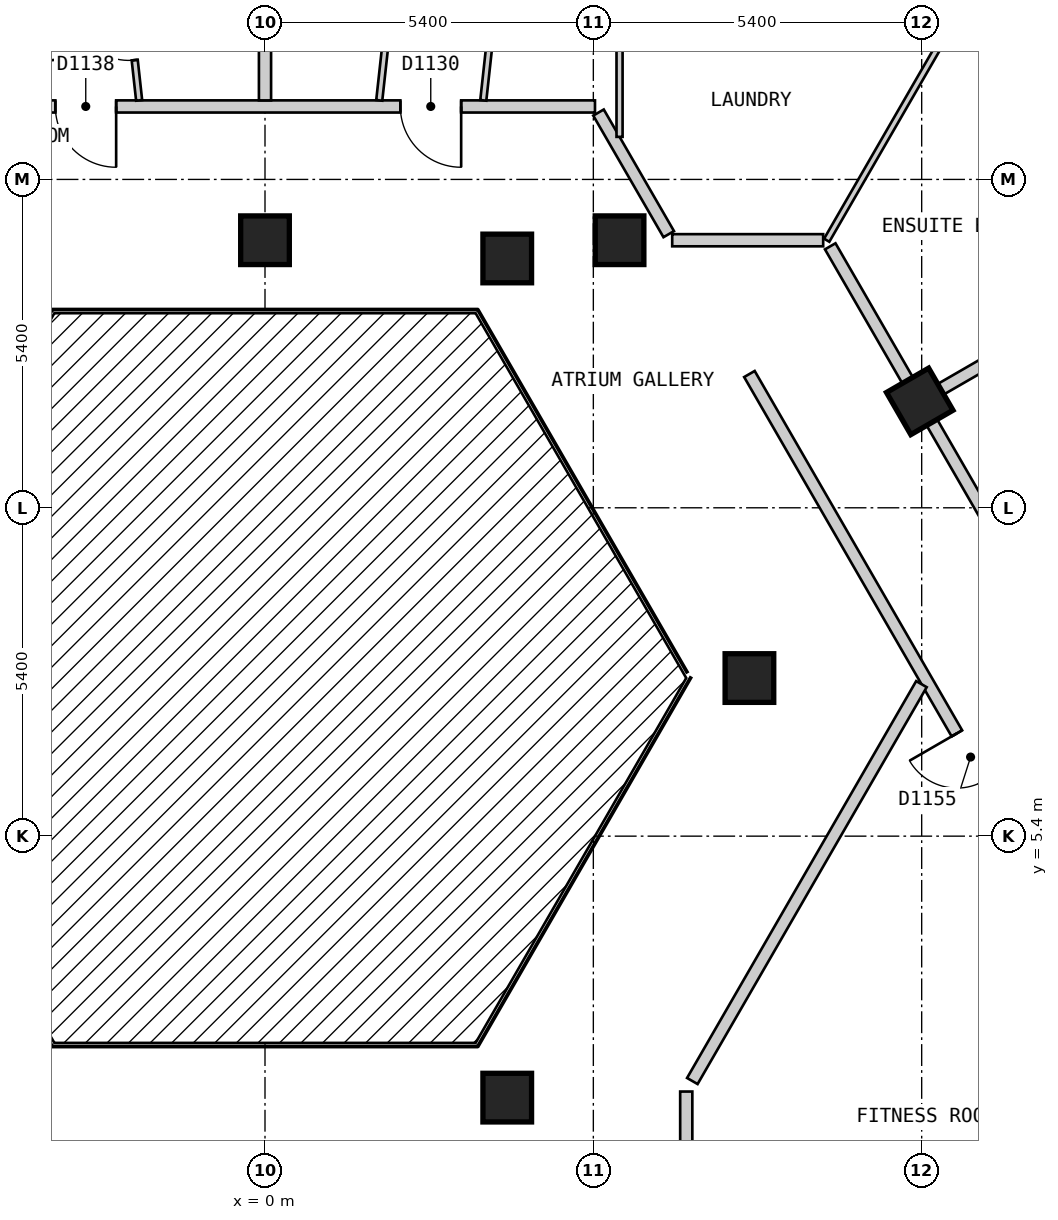
"""IFC4 building model, lengths in metres.
Left out: names, types, materials, properties, quantities, classifications, styles, units other than length and angle.
Written with IfcOpenShell. Run it as: python <this file> out.ifc"""

import sys

from ifc_helpers import new_model, si_unit, direction, frame, frame_2d, origin, origin_2d, place, context, subcontext, project, spatial, rectangle, extrude, element, fill, save


model = new_model("IFC4")
c1 = context("Model", 3, precision=1e-05, world=origin(), true_north=direction((0.0, 1.0)))
c2 = subcontext(c1, "Body", "Model", "MODEL_VIEW")
j1 = project(units=[si_unit("LENGTHUNIT", "METRE"), si_unit("PLANEANGLEUNIT", "RADIAN")], contexts=[c1])
p1 = place(None, origin())
s1 = spatial("IfcSite", under=j1, at=p1, CompositionType="ELEMENT")
p2 = place(p1, origin())
s2 = spatial("IfcBuilding", under=s1, at=p2, CompositionType="ELEMENT")
p3 = place(p2, frame((0.0, 0.0, 138.6)))
s3 = spatial("IfcBuildingStorey", under=s2, at=p3, CompositionType="ELEMENT", Elevation=138.6)
for number, where, z_axis, x_axis in (
    (1, (3.984, 1.1, 0.0), (0.0, 0.0, 1.0), (1.0, 0.0, 0.0)),
    (2, (7.967, 8.0, 0.0), (0.0, 0.0, 1.0), (1.0, 0.0, 0.0)),
    (3, (10.768, 12.55, 0.0), (0.0, 0.0, 1.0), (-0.5, 0.866, 0.0)),
    (4, (5.831, 15.2, 0.0), (0.0, 0.0, 1.0), (-1.0, 0.0, 0.0)),
    (5, (3.984, 14.9, 0.0), (0.0, 0.0, 1.0), (1.0, 0.0, 0.0)),
    (6, (0.0, 15.2, 0.0), (0.0, 0.0, 1.0), (-1.0, 0.0, 0.0)),
):
    element("IfcColumn", number, at=place(p3, frame(where, z_axis=z_axis, x_axis=x_axis)), inside=s3, PredefinedType="COLUMN", context=c2, shape_type="SweptSolid", body=[
        extrude(rectangle(XDim=0.8, YDim=0.8, at=origin_2d()), origin(), (0.0, 0.0, 1.0), 3.0),
    ])
p4 = place(p3, frame((5.485, 17.3, 0.0), z_axis=(0.0, 0.0, 1.0), x_axis=(0.500027479704, -0.866009537788, 0.0)))
e7 = element("IfcWall", 7, at=p4, inside=s3, PredefinedType="PARTITIONING", context=c2, shape_type="SweptSolid", body=[
    extrude(rectangle(XDim=2.309, YDim=0.2, at=frame_2d((1.155, 0.0))), origin(), (0.0, 0.0, 1.0), 2.7),
])
p5 = place(p3, frame((7.967, 13.0, 0.0), z_axis=(0.0, 0.0, 1.0), x_axis=(0.50003774998, -0.866003607726, 0.0)))
e8 = element("IfcWall", 8, at=p5, inside=s3, PredefinedType="PARTITIONING", context=c2, shape_type="SweptSolid", body=[
    extrude(rectangle(XDim=14.433, YDim=0.2, at=frame_2d((7.217, 0.0))), origin(), (0.0, 0.0, 1.0), 2.7),
])
p6 = place(p5, frame((6.824, 0.0, 0.0)))
e9 = element("IfcOpeningElement", 9, at=p6, cuts=e8, PredefinedType="OPENING", context=c2, shape_type="SweptSolid", body=[
    extrude(rectangle(XDim=0.9, YDim=2.1, at=frame_2d((0.45, 1.05))), frame((0.0, 0.11, 0.0), z_axis=(0.0, -1.0, 0.0), x_axis=(1.0, 0.0, 0.0)), (0.0, 0.0, 1.0), 0.22),
])
p7 = place(p3, frame((9.296, 15.1, 0.0), z_axis=(0.0, 0.0, 1.0), x_axis=(0.499974024244, -0.866040400375, 0.0)))
e10 = element("IfcWall", 10, at=p7, inside=s3, PredefinedType="PARTITIONING", context=c2, shape_type="SweptSolid", body=[
    extrude(rectangle(XDim=16.857, YDim=0.2, at=frame_2d((8.429, 0.0))), origin(), (0.0, 0.0, 1.0), 2.7),
])
p8 = place(p7, frame((11.522, 0.0, 0.0)))
e11 = element("IfcOpeningElement", 11, at=p8, cuts=e10, PredefinedType="OPENING", context=c2, shape_type="SweptSolid", body=[
    extrude(rectangle(XDim=1.0, YDim=2.1, at=frame_2d((0.5, 1.05))), frame((0.0, 0.11, 0.0), z_axis=(0.0, -1.0, 0.0), x_axis=(1.0, 0.0, 0.0)), (0.0, 0.0, 1.0), 0.22),
])
p9 = place(p3, frame((6.697, 15.2, 0.0), z_axis=(0.0, 0.0, 1.0), x_axis=(1.0, 0.0, 0.0)))
e12 = element("IfcWall", 12, at=p9, inside=s3, PredefinedType="PARTITIONING", context=c2, shape_type="SweptSolid", body=[
    extrude(rectangle(XDim=2.483, YDim=0.2, at=frame_2d((1.241, 0.0))), origin(), (0.0, 0.0, 1.0), 2.7),
])
p10 = place(p3, frame((-5.312, 17.4, 0.0), z_axis=(0.0, 0.0, 1.0), x_axis=(1.0, 0.0, 0.0)))
e13 = element("IfcWall", 13, at=p10, inside=s3, PredefinedType="PARTITIONING", context=c2, shape_type="SweptSolid", body=[
    extrude(rectangle(XDim=10.739, YDim=0.2, at=frame_2d((5.37, 0.0))), origin(), (0.0, 0.0, 1.0), 2.7),
])
p11 = place(p10, frame((7.538, 0.0, 0.0)))
e14 = element("IfcOpeningElement", 14, at=p11, cuts=e13, PredefinedType="OPENING", context=c2, shape_type="SweptSolid", body=[
    extrude(rectangle(XDim=1.0, YDim=2.1, at=frame_2d((0.5, 1.05))), frame((0.0, 0.11, 0.0), z_axis=(0.0, -1.0, 0.0), x_axis=(1.0, 0.0, 0.0)), (0.0, 0.0, 1.0), 0.22),
])
p12 = place(p10, frame((1.864, 0.0, 0.0)))
e15 = element("IfcOpeningElement", 15, at=p12, cuts=e13, PredefinedType="OPENING", context=c2, shape_type="SweptSolid", body=[
    extrude(rectangle(XDim=1.0, YDim=2.1, at=frame_2d((0.5, 1.05))), frame((0.0, 0.11, 0.0), z_axis=(0.0, -1.0, 0.0), x_axis=(1.0, 0.0, 0.0)), (0.0, 0.0, 1.0), 0.22),
])
p13 = place(p3, frame((7.028, 1.373, 0.0), z_axis=(0.0, 0.0, 1.0), x_axis=(0.499954271211, 0.866051803703, 0.0)))
e16 = element("IfcWall", 16, at=p13, inside=s3, PredefinedType="PARTITIONING", context=c2, shape_type="SweptSolid", body=[
    extrude(rectangle(XDim=7.536, YDim=0.2, at=frame_2d((3.768, 0.0))), origin(), (0.0, 0.0, 1.0), 2.7),
])
p14 = place(p3, frame((6.928, -2.8, 0.0), z_axis=(0.0, 0.0, 1.0), x_axis=(0.0, 1.0, 0.0)))
e17 = element("IfcWall", 17, at=p14, inside=s3, PredefinedType="PARTITIONING", context=c2, shape_type="SweptSolid", body=[
    extrude(rectangle(XDim=4.0, YDim=0.2, at=frame_2d((2.0, 0.0))), origin(), (0.0, 0.0, 1.0), 2.7),
])
p15 = place(p3, frame((11.713, 19.313, 0.0), z_axis=(0.0, 0.0, 1.0), x_axis=(0.499945064984, -0.866057118208, 0.0)))
e18 = element("IfcWall", 18, at=p15, inside=s3, PredefinedType="PARTITIONING", context=c2, shape_type="SweptSolid", body=[
    extrude(rectangle(XDim=5.285, YDim=0.1, at=frame_2d((2.642, 0.0))), origin(), (0.0, 0.0, 1.0), 2.7),
])
p16 = place(p15, frame((2.242, 0.0, 0.0)))
e19 = element("IfcOpeningElement", 19, at=p16, cuts=e18, PredefinedType="OPENING", context=c2, shape_type="SweptSolid", body=[
    extrude(rectangle(XDim=0.8, YDim=2.1, at=frame_2d((0.4, 1.05))), frame((0.0, 0.06, 0.0), z_axis=(0.0, -1.0, 0.0), x_axis=(1.0, 0.0, 0.0)), (0.0, 0.0, 1.0), 0.12),
])
p17 = place(p3, frame((-2.319, 19.77, 0.0), z_axis=(0.0, 0.0, 1.0), x_axis=(0.109046821538, -0.994036614372, 0.0)))
e20 = element("IfcWall", 20, at=p17, inside=s3, PredefinedType="PARTITIONING", context=c2, shape_type="SweptSolid", body=[
    extrude(rectangle(XDim=2.284, YDim=0.1, at=frame_2d((1.142, 0.0))), origin(), (0.0, 0.0, 1.0), 2.7),
])
p18 = place(p17, frame((0.717, 0.0, 0.0)))
e21 = element("IfcOpeningElement", 21, at=p18, cuts=e20, PredefinedType="OPENING", context=c2, shape_type="SweptSolid", body=[
    extrude(rectangle(XDim=0.9, YDim=2.1, at=frame_2d((0.45, 1.05))), frame((0.0, 0.06, 0.0), z_axis=(0.0, -1.0, 0.0), x_axis=(1.0, 0.0, 0.0)), (0.0, 0.0, 1.0), 0.12),
])
p19 = place(p3, frame((9.238, 15.2, 0.0), z_axis=(0.0, 0.0, 1.0), x_axis=(0.499988022762, 0.866032318735, 0.0)))
e22 = element("IfcWall", 22, at=p19, inside=s3, PredefinedType="PARTITIONING", context=c2, shape_type="SweptSolid", body=[
    extrude(rectangle(XDim=4.748, YDim=0.1, at=frame_2d((2.374, 0.0))), origin(), (0.0, 0.0, 1.0), 2.7),
])
p20 = place(p3, frame((3.59, 17.5, 0.0), z_axis=(0.0, 0.0, 1.0), x_axis=(0.108938463119, 0.994048495423, 0.0)))
e23 = element("IfcWall", 23, at=p20, inside=s3, PredefinedType="PARTITIONING", context=c2, shape_type="SweptSolid", body=[
    extrude(rectangle(XDim=4.074, YDim=0.1, at=frame_2d((2.037, 0.0))), origin(), (0.0, 0.0, 1.0), 2.7),
])
p21 = place(p20, frame((1.612, 0.0, 0.0)))
e24 = element("IfcOpeningElement", 24, at=p21, cuts=e23, PredefinedType="OPENING", context=c2, shape_type="SweptSolid", body=[
    extrude(rectangle(XDim=0.8, YDim=2.1, at=frame_2d((0.4, 1.05))), frame((0.0, 0.06, 0.0), z_axis=(0.0, -1.0, 0.0), x_axis=(1.0, 0.0, 0.0)), (0.0, 0.0, 1.0), 0.12),
])
p22 = place(p3, frame((1.879, 17.5, 0.0), z_axis=(0.0, 0.0, 1.0), x_axis=(0.10923450369, 0.994016007519, 0.0)))
e25 = element("IfcWall", 25, at=p22, inside=s3, PredefinedType="PARTITIONING", context=c2, shape_type="SweptSolid", body=[
    extrude(rectangle(XDim=4.074, YDim=0.1, at=frame_2d((2.037, 0.0))), origin(), (0.0, 0.0, 1.0), 2.7),
])
p23 = place(p22, frame((1.562, 0.0, 0.0)))
e26 = element("IfcOpeningElement", 26, at=p23, cuts=e25, PredefinedType="OPENING", context=c2, shape_type="SweptSolid", body=[
    extrude(rectangle(XDim=0.9, YDim=2.1, at=frame_2d((0.45, 1.05))), frame((0.0, 0.06, 0.0), z_axis=(0.0, -1.0, 0.0), x_axis=(1.0, 0.0, 0.0)), (0.0, 0.0, 1.0), 0.12),
])
p24 = place(p3, frame((5.831, 16.9, 0.0), z_axis=(0.0, 0.0, 1.0), x_axis=(0.0, 1.0, 0.0)))
e27 = element("IfcWall", 27, at=p24, inside=s3, PredefinedType="PARTITIONING", context=c2, shape_type="SweptSolid", body=[
    extrude(rectangle(XDim=4.65, YDim=0.1, at=frame_2d((2.325, 0.0))), origin(), (0.0, 0.0, 1.0), 2.7),
])
p25 = place(p3, frame((0.0, 17.5, 0.0), z_axis=(0.0, 0.0, 1.0), x_axis=(0.0, 1.0, 0.0)))
e28 = element("IfcWall", 28, at=p25, inside=s3, PredefinedType="PARTITIONING", context=c2, shape_type="SweptSolid", body=[
    extrude(rectangle(XDim=7.8, YDim=0.2, at=frame_2d((3.9, 0.0))), origin(), (0.0, 0.0, 1.0), 2.7),
])
p26 = place(p3, frame((10.854, 12.6, 0.0), z_axis=(0.0, 0.0, 1.0), x_axis=(0.866031112038, 0.499990112884, 0.0)))
e29 = element("IfcWall", 29, at=p26, inside=s3, PredefinedType="PARTITIONING", context=c2, shape_type="SweptSolid", body=[
    extrude(rectangle(XDim=3.948, YDim=0.2, at=frame_2d((1.974, 0.0))), origin(), (0.0, 0.0, 1.0), 2.7),
])
p27 = place(p11, origin())
e30 = element("IfcDoor", 30, at=p27, inside=s3, OperationType="SINGLE_SWING_RIGHT", PredefinedType="DOOR", context=c2, shape_type="SweptSolid", body=[
    extrude(rectangle(XDim=1.0, YDim=2.1, at=frame_2d((0.5, 1.05))), frame((0.0, 0.025, 0.0), z_axis=(0.0, -1.0, 0.0), x_axis=(1.0, 0.0, 0.0)), (0.0, 0.0, 1.0), 0.05),
])
fill(e14, e30)
p28 = place(p12, origin())
e31 = element("IfcDoor", 31, at=p28, inside=s3, OperationType="SINGLE_SWING_RIGHT", PredefinedType="DOOR", context=c2, shape_type="SweptSolid", body=[
    extrude(rectangle(XDim=1.0, YDim=2.1, at=frame_2d((0.5, 1.05))), frame((0.0, 0.025, 0.0), z_axis=(0.0, -1.0, 0.0), x_axis=(1.0, 0.0, 0.0)), (0.0, 0.0, 1.0), 0.05),
])
fill(e15, e31)
p29 = place(p18, origin())
e32 = element("IfcDoor", 32, at=p29, inside=s3, OperationType="SINGLE_SWING_LEFT", PredefinedType="DOOR", context=c2, shape_type="SweptSolid", body=[
    extrude(rectangle(XDim=0.9, YDim=2.1, at=frame_2d((0.45, 1.05))), frame((0.0, 0.025, 0.0), z_axis=(0.0, -1.0, 0.0), x_axis=(1.0, 0.0, 0.0)), (0.0, 0.0, 1.0), 0.05),
])
fill(e21, e32)
p30 = place(p6, origin())
e33 = element("IfcDoor", 33, at=p30, inside=s3, OperationType="SINGLE_SWING_LEFT", PredefinedType="DOOR", context=c2, shape_type="SweptSolid", body=[
    extrude(rectangle(XDim=0.9, YDim=2.1, at=frame_2d((0.45, 1.05))), frame((0.0, 0.025, 0.0), z_axis=(0.0, -1.0, 0.0), x_axis=(1.0, 0.0, 0.0)), (0.0, 0.0, 1.0), 0.05),
])
fill(e9, e33)
save(model, sys.argv[1])
